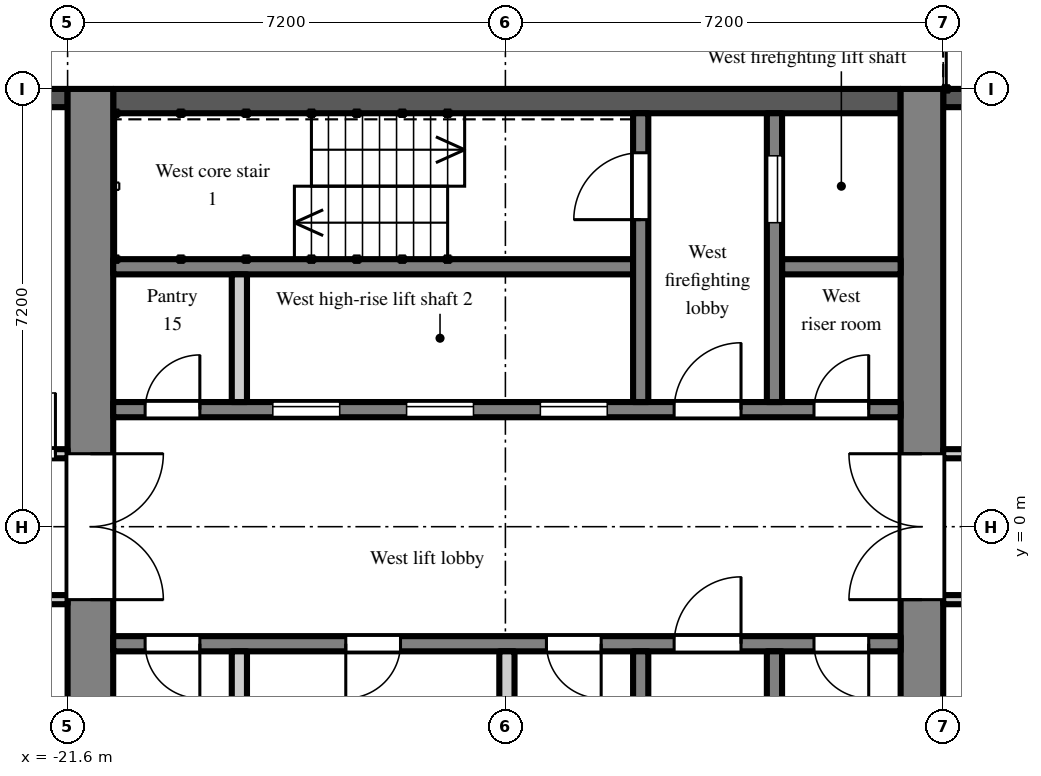
"""IFC4 building model, lengths in metres.
Left out: names, types, materials, properties, quantities, classifications, styles, units other than length and angle.
Written with IfcOpenShell. Run it as: python <this file> out.ifc"""

import sys

from ifc_helpers import new_model, si_unit, direction, frame, frame_2d, origin, place, context, subcontext, project, spatial, rectangle, extrude, element, fill, save


model = new_model("IFC4")
c1 = context("Model", 3, precision=1e-05, world=origin(), true_north=direction((0.0, 1.0)))
c2 = subcontext(c1, "Body", "Model", "MODEL_VIEW")
j1 = project(units=[si_unit("LENGTHUNIT", "METRE"), si_unit("PLANEANGLEUNIT", "RADIAN")], contexts=[c1])
p1 = place(None, origin())
s1 = spatial("IfcSite", under=j1, at=p1, CompositionType="ELEMENT")
p2 = place(p1, origin())
s2 = spatial("IfcBuilding", under=s1, at=p2, CompositionType="ELEMENT")
p3 = place(p2, frame((0.0, 0.0, 231.9)))
s3 = spatial("IfcBuildingStorey", under=s2, at=p3, CompositionType="ELEMENT", Elevation=231.9)
p4 = place(p3, frame((-4.2, 7.05, 0.0), z_axis=(0.0, 0.0, 1.0), x_axis=(-1.0, 0.0, 0.0)))
e1 = element("IfcWall", 1, at=p4, inside=s3, PredefinedType="SOLIDWALL", context=c2, shape_type="SweptSolid", body=[
    extrude(rectangle(XDim=3.0, YDim=0.3, at=frame_2d((1.5, 0.0))), origin(), (0.0, 0.0, 1.0), 2.3),
])
p5 = place(p3, frame((-21.6, 7.05, 0.0), z_axis=(0.0, 0.0, 1.0), x_axis=(-1.0, 0.0, 0.0)))
e2 = element("IfcWall", 2, at=p5, inside=s3, PredefinedType="SOLIDWALL", context=c2, shape_type="SweptSolid", body=[
    extrude(rectangle(XDim=2.7, YDim=0.3, at=frame_2d((1.35, 0.0))), origin(), (0.0, 0.0, 1.0), 2.3),
])
p6 = place(p5, frame((0.75, 0.0, 0.2)))
e3 = element("IfcOpeningElement", 3, at=p6, cuts=e2, PredefinedType="OPENING", context=c2, shape_type="SweptSolid", body=[
    extrude(rectangle(XDim=1.2, YDim=1.85, at=frame_2d((0.6, 0.925))), frame((0.0, 0.16, 0.0), z_axis=(0.0, -1.0, 0.0), x_axis=(1.0, 0.0, 0.0)), (0.0, 0.0, 1.0), 0.32),
])
p7 = place(p3, frame((-7.55, -7.2, 0.0), z_axis=(0.0, 0.0, 1.0), x_axis=(0.0, 1.0, 0.0)))
e4 = element("IfcWall", 4, at=p7, inside=s3, PredefinedType="SHEAR", context=c2, shape_type="SweptSolid", body=[
    extrude(rectangle(XDim=14.4, YDim=0.7, at=frame_2d((7.2, 0.0))), origin(), (0.0, 0.0, 1.0), 2.6),
])
p8 = place(p7, frame((6.0, 0.0, 0.0)))
e5 = element("IfcOpeningElement", 5, at=p8, cuts=e4, PredefinedType="OPENING", context=c2, shape_type="SweptSolid", body=[
    extrude(rectangle(XDim=2.4, YDim=2.2, at=frame_2d((1.2, 1.1))), frame((0.0, 0.36, 0.0), z_axis=(0.0, -1.0, 0.0), x_axis=(1.0, 0.0, 0.0)), (0.0, 0.0, 1.0), 0.72),
])
p9 = place(p3, frame((-21.225, -7.2, 0.0), z_axis=(0.0, 0.0, 1.0), x_axis=(0.0, 1.0, 0.0)))
e6 = element("IfcWall", 6, at=p9, inside=s3, PredefinedType="SHEAR", context=c2, shape_type="SweptSolid", body=[
    extrude(rectangle(XDim=14.4, YDim=0.75, at=frame_2d((7.2, 0.0))), origin(), (0.0, 0.0, 1.0), 2.6),
])
p10 = place(p9, frame((6.0, 0.0, 0.0)))
e7 = element("IfcOpeningElement", 7, at=p10, cuts=e6, PredefinedType="OPENING", context=c2, shape_type="SweptSolid", body=[
    extrude(rectangle(XDim=2.4, YDim=2.2, at=frame_2d((1.2, 1.1))), frame((0.0, 0.385, 0.0), z_axis=(0.0, -1.0, 0.0), x_axis=(1.0, 0.0, 0.0)), (0.0, 0.0, 1.0), 0.77),
])
p11 = place(p3, frame((-7.9, 7.0, 0.0), z_axis=(0.0, 0.0, 1.0), x_axis=(-1.0, 0.0, 0.0)))
e8 = element("IfcWall", 8, at=p11, inside=s3, PredefinedType="SHEAR", context=c2, shape_type="SweptSolid", body=[
    extrude(rectangle(XDim=12.95, YDim=0.4, at=frame_2d((6.475, 0.0))), origin(), (0.0, 0.0, 1.0), 2.6),
])
p12 = place(p3, frame((-7.9, 1.925, 0.0), z_axis=(0.0, 0.0, 1.0), x_axis=(-1.0, 0.0, 0.0)))
e9 = element("IfcWall", 9, at=p12, inside=s3, PredefinedType="SHEAR", context=c2, shape_type="SweptSolid", body=[
    extrude(rectangle(XDim=12.95, YDim=0.25, at=frame_2d((6.475, 0.0))), origin(), (0.0, 0.0, 1.0), 2.6),
])
p13 = place(p12, frame((4.825, 0.0, 0.0)))
e10 = element("IfcOpeningElement", 10, at=p13, cuts=e9, PredefinedType="OPENING", context=c2, shape_type="SweptSolid", body=[
    extrude(rectangle(XDim=1.1, YDim=2.1, at=frame_2d((0.55, 1.05))), frame((0.0, 0.135, 0.0), z_axis=(0.0, -1.0, 0.0), x_axis=(1.0, 0.0, 0.0)), (0.0, 0.0, 1.0), 0.27),
])
p14 = place(p12, frame((7.025, 0.0, 0.0)))
e11 = element("IfcOpeningElement", 11, at=p14, cuts=e9, PredefinedType="OPENING", context=c2, shape_type="SweptSolid", body=[
    extrude(rectangle(XDim=1.1, YDim=2.1, at=frame_2d((0.55, 1.05))), frame((0.0, 0.135, 0.0), z_axis=(0.0, -1.0, 0.0), x_axis=(1.0, 0.0, 0.0)), (0.0, 0.0, 1.0), 0.27),
])
p15 = place(p12, frame((9.225, 0.0, 0.0)))
e12 = element("IfcOpeningElement", 12, at=p15, cuts=e9, PredefinedType="OPENING", context=c2, shape_type="SweptSolid", body=[
    extrude(rectangle(XDim=1.1, YDim=2.1, at=frame_2d((0.55, 1.05))), frame((0.0, 0.135, 0.0), z_axis=(0.0, -1.0, 0.0), x_axis=(1.0, 0.0, 0.0)), (0.0, 0.0, 1.0), 0.27),
])
p16 = place(p12, frame((0.525, 0.0, 0.0)))
e13 = element("IfcOpeningElement", 13, at=p16, cuts=e9, PredefinedType="OPENING", context=c2, shape_type="SweptSolid", body=[
    extrude(rectangle(XDim=0.9, YDim=2.1, at=frame_2d((0.45, 1.05))), frame((0.0, 0.135, 0.0), z_axis=(0.0, -1.0, 0.0), x_axis=(1.0, 0.0, 0.0)), (0.0, 0.0, 1.0), 0.27),
])
p17 = place(p12, frame((2.625, 0.0, 0.0)))
e14 = element("IfcOpeningElement", 14, at=p17, cuts=e9, PredefinedType="OPENING", context=c2, shape_type="SweptSolid", body=[
    extrude(rectangle(XDim=1.1, YDim=2.1, at=frame_2d((0.55, 1.05))), frame((0.0, 0.135, 0.0), z_axis=(0.0, -1.0, 0.0), x_axis=(1.0, 0.0, 0.0)), (0.0, 0.0, 1.0), 0.27),
])
p18 = place(p12, frame((11.525, 0.0, 0.0)))
e15 = element("IfcOpeningElement", 15, at=p18, cuts=e9, PredefinedType="OPENING", context=c2, shape_type="SweptSolid", body=[
    extrude(rectangle(XDim=0.9, YDim=2.1, at=frame_2d((0.45, 1.05))), frame((0.0, 0.135, 0.0), z_axis=(0.0, -1.0, 0.0), x_axis=(1.0, 0.0, 0.0)), (0.0, 0.0, 1.0), 0.27),
])
p19 = place(p3, frame((-7.9, 4.275, 0.0), z_axis=(0.0, 0.0, 1.0), x_axis=(-1.0, 0.0, 0.0)))
e16 = element("IfcWall", 16, at=p19, inside=s3, PredefinedType="SHEAR", context=c2, shape_type="SweptSolid", body=[
    extrude(rectangle(XDim=1.95, YDim=0.25, at=frame_2d((0.975, 0.0))), origin(), (0.0, 0.0, 1.0), 2.6),
])
p20 = place(p3, frame((-12.3, 4.275, 0.0), z_axis=(0.0, 0.0, 1.0), x_axis=(-1.0, 0.0, 0.0)))
e17 = element("IfcWall", 17, at=p20, inside=s3, PredefinedType="SHEAR", context=c2, shape_type="SweptSolid", body=[
    extrude(rectangle(XDim=8.55, YDim=0.25, at=frame_2d((4.275, 0.0))), origin(), (0.0, 0.0, 1.0), 2.6),
])
p21 = place(p3, frame((-9.975, 2.05, 0.0), z_axis=(0.0, 0.0, 1.0), x_axis=(0.0, 1.0, 0.0)))
e18 = element("IfcWall", 18, at=p21, inside=s3, PredefinedType="SHEAR", context=c2, shape_type="SweptSolid", body=[
    extrude(rectangle(XDim=4.75, YDim=0.25, at=frame_2d((2.375, 0.0))), origin(), (0.0, 0.0, 1.0), 2.6),
])
p22 = place(p21, frame((2.95, 0.0, 0.0)))
e19 = element("IfcOpeningElement", 19, at=p22, cuts=e18, PredefinedType="OPENING", context=c2, shape_type="SweptSolid", body=[
    extrude(rectangle(XDim=1.1, YDim=2.1, at=frame_2d((0.55, 1.05))), frame((0.0, 0.135, 0.0), z_axis=(0.0, -1.0, 0.0), x_axis=(1.0, 0.0, 0.0)), (0.0, 0.0, 1.0), 0.27),
])
p23 = place(p3, frame((-12.175, 2.05, 0.0), z_axis=(0.0, 0.0, 1.0), x_axis=(0.0, 1.0, 0.0)))
e20 = element("IfcWall", 20, at=p23, inside=s3, PredefinedType="SHEAR", context=c2, shape_type="SweptSolid", body=[
    extrude(rectangle(XDim=4.75, YDim=0.25, at=frame_2d((2.375, 0.0))), origin(), (0.0, 0.0, 1.0), 2.6),
])
p24 = place(p23, frame((3.0, 0.0, 0.0)))
e21 = element("IfcOpeningElement", 21, at=p24, cuts=e20, PredefinedType="OPENING", context=c2, shape_type="SweptSolid", body=[
    extrude(rectangle(XDim=1.1, YDim=2.1, at=frame_2d((0.55, 1.05))), frame((0.0, 0.135, 0.0), z_axis=(0.0, -1.0, 0.0), x_axis=(1.0, 0.0, 0.0)), (0.0, 0.0, 1.0), 0.27),
])
p25 = place(p3, frame((-18.775, 2.05, 0.0), z_axis=(0.0, 0.0, 1.0), x_axis=(0.0, 1.0, 0.0)))
e22 = element("IfcWall", 22, at=p25, inside=s3, PredefinedType="PARTITIONING", context=c2, shape_type="SweptSolid", body=[
    extrude(rectangle(XDim=2.1, YDim=0.25, at=frame_2d((1.05, 0.0))), origin(), (0.0, 0.0, 1.0), 2.6),
])
p26 = place(p3, frame((-7.9, -1.925, 0.0), z_axis=(0.0, 0.0, 1.0), x_axis=(-1.0, 0.0, 0.0)))
e23 = element("IfcWall", 23, at=p26, inside=s3, PredefinedType="SHEAR", context=c2, shape_type="SweptSolid", body=[
    extrude(rectangle(XDim=12.95, YDim=0.25, at=frame_2d((6.475, 0.0))), origin(), (0.0, 0.0, 1.0), 2.6),
])
p27 = place(p26, frame((0.525, 0.0, 0.0)))
e24 = element("IfcOpeningElement", 24, at=p27, cuts=e23, PredefinedType="OPENING", context=c2, shape_type="SweptSolid", body=[
    extrude(rectangle(XDim=0.9, YDim=2.1, at=frame_2d((0.45, 1.05))), frame((0.0, 0.135, 0.0), z_axis=(0.0, -1.0, 0.0), x_axis=(1.0, 0.0, 0.0)), (0.0, 0.0, 1.0), 0.27),
])
p28 = place(p26, frame((2.625, 0.0, 0.0)))
e25 = element("IfcOpeningElement", 25, at=p28, cuts=e23, PredefinedType="OPENING", context=c2, shape_type="SweptSolid", body=[
    extrude(rectangle(XDim=1.1, YDim=2.1, at=frame_2d((0.55, 1.05))), frame((0.0, 0.135, 0.0), z_axis=(0.0, -1.0, 0.0), x_axis=(1.0, 0.0, 0.0)), (0.0, 0.0, 1.0), 0.27),
])
p29 = place(p26, frame((4.925, 0.0, 0.0)))
e26 = element("IfcOpeningElement", 26, at=p29, cuts=e23, PredefinedType="OPENING", context=c2, shape_type="SweptSolid", body=[
    extrude(rectangle(XDim=0.9, YDim=2.1, at=frame_2d((0.45, 1.05))), frame((0.0, 0.135, 0.0), z_axis=(0.0, -1.0, 0.0), x_axis=(1.0, 0.0, 0.0)), (0.0, 0.0, 1.0), 0.27),
])
p30 = place(p26, frame((8.225, 0.0, 0.0)))
e27 = element("IfcOpeningElement", 27, at=p30, cuts=e23, PredefinedType="OPENING", context=c2, shape_type="SweptSolid", body=[
    extrude(rectangle(XDim=0.9, YDim=2.1, at=frame_2d((0.45, 1.05))), frame((0.0, 0.135, 0.0), z_axis=(0.0, -1.0, 0.0), x_axis=(1.0, 0.0, 0.0)), (0.0, 0.0, 1.0), 0.27),
])
p31 = place(p26, frame((11.525, 0.0, 0.0)))
e28 = element("IfcOpeningElement", 28, at=p31, cuts=e23, PredefinedType="OPENING", context=c2, shape_type="SweptSolid", body=[
    extrude(rectangle(XDim=0.9, YDim=2.1, at=frame_2d((0.45, 1.05))), frame((0.0, 0.135, 0.0), z_axis=(0.0, -1.0, 0.0), x_axis=(1.0, 0.0, 0.0)), (0.0, 0.0, 1.0), 0.27),
])
p32 = place(p3, frame((-9.975, -2.05, 0.0), z_axis=(0.0, 0.0, 1.0), x_axis=(0.0, -1.0, 0.0)))
e29 = element("IfcWall", 29, at=p32, inside=s3, PredefinedType="SHEAR", context=c2, shape_type="SweptSolid", body=[
    extrude(rectangle(XDim=4.75, YDim=0.25, at=frame_2d((2.375, 0.0))), origin(), (0.0, 0.0, 1.0), 2.6),
])
p33 = place(p32, frame((2.95, 0.0, 0.0)))
e30 = element("IfcOpeningElement", 30, at=p33, cuts=e29, PredefinedType="OPENING", context=c2, shape_type="SweptSolid", body=[
    extrude(rectangle(XDim=1.1, YDim=2.1, at=frame_2d((0.55, 1.05))), frame((0.0, 0.135, 0.0), z_axis=(0.0, -1.0, 0.0), x_axis=(1.0, 0.0, 0.0)), (0.0, 0.0, 1.0), 0.27),
])
p34 = place(p3, frame((-12.175, -2.05, 0.0), z_axis=(0.0, 0.0, 1.0), x_axis=(0.0, -1.0, 0.0)))
e31 = element("IfcWall", 31, at=p34, inside=s3, PredefinedType="SHEAR", context=c2, shape_type="SweptSolid", body=[
    extrude(rectangle(XDim=4.75, YDim=0.25, at=frame_2d((2.375, 0.0))), origin(), (0.0, 0.0, 1.0), 2.6),
])
p35 = place(p34, frame((3.0, 0.0, 0.0)))
e32 = element("IfcOpeningElement", 32, at=p35, cuts=e31, PredefinedType="OPENING", context=c2, shape_type="SweptSolid", body=[
    extrude(rectangle(XDim=1.1, YDim=2.1, at=frame_2d((0.55, 1.05))), frame((0.0, 0.135, 0.0), z_axis=(0.0, -1.0, 0.0), x_axis=(1.0, 0.0, 0.0)), (0.0, 0.0, 1.0), 0.27),
])
for number, where, z_axis, x_axis in (
    (33, (-14.375, -2.05, 0.0), (0.0, 0.0, 1.0), (0.0, -1.0, 0.0)),
    (34, (-18.775, -2.05, 0.0), (0.0, 0.0, 1.0), (0.0, -1.0, 0.0)),
):
    element("IfcWall", number, at=place(p3, frame(where, z_axis=z_axis, x_axis=x_axis)), inside=s3, PredefinedType="PARTITIONING", context=c2, shape_type="SweptSolid", body=[
        extrude(rectangle(XDim=2.1, YDim=0.25, at=frame_2d((1.05, 0.0))), origin(), (0.0, 0.0, 1.0), 2.6),
    ])
p36 = place(p3, frame((-26.725, -1.2, 0.0), z_axis=(0.0, 0.0, 1.0), x_axis=(1.0, 0.0, 0.0)))
e35 = element("IfcWall", 35, at=p36, inside=s3, PredefinedType="PARTITIONING", context=c2, shape_type="SweptSolid", body=[
    extrude(rectangle(XDim=5.125, YDim=0.15, at=frame_2d((2.562, 0.0))), origin(), (0.0, 0.0, 1.0), 2.6),
])
p37 = place(p36, frame((3.525, 0.0, 0.0)))
e36 = element("IfcOpeningElement", 36, at=p37, cuts=e35, PredefinedType="OPENING", context=c2, shape_type="SweptSolid", body=[
    extrude(rectangle(XDim=1.0, YDim=2.1, at=frame_2d((0.5, 1.05))), frame((0.0, 0.085, 0.0), z_axis=(0.0, -1.0, 0.0), x_axis=(1.0, 0.0, 0.0)), (0.0, 0.0, 1.0), 0.17),
])
p38 = place(p3, frame((-26.725, 1.2, 0.0), z_axis=(0.0, 0.0, 1.0), x_axis=(1.0, 0.0, 0.0)))
e37 = element("IfcWall", 37, at=p38, inside=s3, PredefinedType="PARTITIONING", context=c2, shape_type="SweptSolid", body=[
    extrude(rectangle(XDim=5.125, YDim=0.15, at=frame_2d((2.562, 0.0))), origin(), (0.0, 0.0, 1.0), 2.6),
])
p39 = place(p38, frame((3.925, 0.0, 0.0)))
e38 = element("IfcOpeningElement", 38, at=p39, cuts=e37, PredefinedType="OPENING", context=c2, shape_type="SweptSolid", body=[
    extrude(rectangle(XDim=1.0, YDim=2.1, at=frame_2d((0.5, 1.05))), frame((0.0, 0.085, 0.0), z_axis=(0.0, -1.0, 0.0), x_axis=(1.0, 0.0, 0.0)), (0.0, 0.0, 1.0), 0.17),
])
p40 = place(p38, frame((0.275, 0.0, 0.0)))
e39 = element("IfcOpeningElement", 39, at=p40, cuts=e37, PredefinedType="OPENING", context=c2, shape_type="SweptSolid", body=[
    extrude(rectangle(XDim=0.9, YDim=2.1, at=frame_2d((0.45, 1.05))), frame((0.0, 0.085, 0.0), z_axis=(0.0, -1.0, 0.0), x_axis=(1.0, 0.0, 0.0)), (0.0, 0.0, 1.0), 0.17),
])
p41 = place(p3, frame((-7.2, -1.2, 0.0), z_axis=(0.0, 0.0, 1.0), x_axis=(1.0, 0.0, 0.0)))
e40 = element("IfcWall", 40, at=p41, inside=s3, PredefinedType="PARTITIONING", context=c2, shape_type="SweptSolid", body=[
    extrude(rectangle(XDim=6.075, YDim=0.15, at=frame_2d((3.038, 0.0))), origin(), (0.0, 0.0, 1.0), 2.6),
])
p42 = place(p41, frame((2.55, 0.0, 0.0)))
e41 = element("IfcOpeningElement", 41, at=p42, cuts=e40, PredefinedType="OPENING", context=c2, shape_type="SweptSolid", body=[
    extrude(rectangle(XDim=0.9, YDim=2.1, at=frame_2d((0.45, 1.05))), frame((0.0, 0.085, 0.0), z_axis=(0.0, -1.0, 0.0), x_axis=(1.0, 0.0, 0.0)), (0.0, 0.0, 1.0), 0.17),
])
p43 = place(p41, frame((0.55, 0.0, 0.0)))
e42 = element("IfcOpeningElement", 42, at=p43, cuts=e40, PredefinedType="OPENING", context=c2, shape_type="SweptSolid", body=[
    extrude(rectangle(XDim=0.9, YDim=2.1, at=frame_2d((0.45, 1.05))), frame((0.0, 0.085, 0.0), z_axis=(0.0, -1.0, 0.0), x_axis=(1.0, 0.0, 0.0)), (0.0, 0.0, 1.0), 0.17),
])
p44 = place(p3, frame((-7.2, 1.2, 0.0), z_axis=(0.0, 0.0, 1.0), x_axis=(1.0, 0.0, 0.0)))
e43 = element("IfcWall", 43, at=p44, inside=s3, PredefinedType="PARTITIONING", context=c2, shape_type="SweptSolid", body=[
    extrude(rectangle(XDim=6.075, YDim=0.15, at=frame_2d((3.038, 0.0))), origin(), (0.0, 0.0, 1.0), 2.6),
])
p45 = place(p44, frame((1.95, 0.0, 0.0)))
e44 = element("IfcOpeningElement", 44, at=p45, cuts=e43, PredefinedType="OPENING", context=c2, shape_type="SweptSolid", body=[
    extrude(rectangle(XDim=0.9, YDim=2.1, at=frame_2d((0.45, 1.05))), frame((0.0, 0.085, 0.0), z_axis=(0.0, -1.0, 0.0), x_axis=(1.0, 0.0, 0.0)), (0.0, 0.0, 1.0), 0.17),
])
p46 = place(p13, origin())
e45 = element("IfcDoor", 45, at=p46, inside=s3, OperationType="SLIDING_TO_LEFT", PredefinedType="DOOR", context=c2, shape_type="SweptSolid", body=[
    extrude(rectangle(XDim=1.1, YDim=2.1, at=frame_2d((0.55, 1.05))), frame((0.0, 0.025, 0.0), z_axis=(0.0, -1.0, 0.0), x_axis=(1.0, 0.0, 0.0)), (0.0, 0.0, 1.0), 0.05),
])
fill(e10, e45)
p47 = place(p14, origin())
e46 = element("IfcDoor", 46, at=p47, inside=s3, OperationType="SLIDING_TO_LEFT", PredefinedType="DOOR", context=c2, shape_type="SweptSolid", body=[
    extrude(rectangle(XDim=1.1, YDim=2.1, at=frame_2d((0.55, 1.05))), frame((0.0, 0.025, 0.0), z_axis=(0.0, -1.0, 0.0), x_axis=(1.0, 0.0, 0.0)), (0.0, 0.0, 1.0), 0.05),
])
fill(e11, e46)
p48 = place(p15, origin())
e47 = element("IfcDoor", 47, at=p48, inside=s3, OperationType="SLIDING_TO_LEFT", PredefinedType="DOOR", context=c2, shape_type="SweptSolid", body=[
    extrude(rectangle(XDim=1.1, YDim=2.1, at=frame_2d((0.55, 1.05))), frame((0.0, 0.025, 0.0), z_axis=(0.0, -1.0, 0.0), x_axis=(1.0, 0.0, 0.0)), (0.0, 0.0, 1.0), 0.05),
])
fill(e12, e47)
p49 = place(p22, origin())
e48 = element("IfcDoor", 48, at=p49, inside=s3, OperationType="SLIDING_TO_LEFT", PredefinedType="DOOR", context=c2, shape_type="SweptSolid", body=[
    extrude(rectangle(XDim=1.1, YDim=2.1, at=frame_2d((0.55, 1.05))), frame((0.0, 0.025, 0.0), z_axis=(0.0, -1.0, 0.0), x_axis=(1.0, 0.0, 0.0)), (0.0, 0.0, 1.0), 0.05),
])
fill(e19, e48)
p50 = place(p24, origin())
e49 = element("IfcDoor", 49, at=p50, inside=s3, OperationType="SINGLE_SWING_LEFT", PredefinedType="DOOR", context=c2, shape_type="SweptSolid", body=[
    extrude(rectangle(XDim=1.1, YDim=2.1, at=frame_2d((0.55, 1.05))), frame((0.0, 0.025, 0.0), z_axis=(0.0, -1.0, 0.0), x_axis=(1.0, 0.0, 0.0)), (0.0, 0.0, 1.0), 0.05),
])
fill(e21, e49)
p51 = place(p16, frame((0.9, 0.0, 0.0), z_axis=(0.0, 0.0, 1.0), x_axis=(-1.0, 0.0, 0.0)))
e50 = element("IfcDoor", 50, at=p51, inside=s3, OperationType="SINGLE_SWING_RIGHT", PredefinedType="DOOR", context=c2, shape_type="SweptSolid", body=[
    extrude(rectangle(XDim=0.9, YDim=2.1, at=frame_2d((0.45, 1.05))), frame((0.0, 0.025, 0.0), z_axis=(0.0, -1.0, 0.0), x_axis=(1.0, 0.0, 0.0)), (0.0, 0.0, 1.0), 0.05),
])
fill(e13, e50)
p52 = place(p27, origin())
e51 = element("IfcDoor", 51, at=p52, inside=s3, OperationType="SINGLE_SWING_LEFT", PredefinedType="DOOR", context=c2, shape_type="SweptSolid", body=[
    extrude(rectangle(XDim=0.9, YDim=2.1, at=frame_2d((0.45, 1.05))), frame((0.0, 0.025, 0.0), z_axis=(0.0, -1.0, 0.0), x_axis=(1.0, 0.0, 0.0)), (0.0, 0.0, 1.0), 0.05),
])
fill(e24, e51)
p53 = place(p17, frame((1.1, 0.0, 0.0), z_axis=(0.0, 0.0, 1.0), x_axis=(-1.0, 0.0, 0.0)))
e52 = element("IfcDoor", 52, at=p53, inside=s3, OperationType="SINGLE_SWING_RIGHT", PredefinedType="DOOR", context=c2, shape_type="SweptSolid", body=[
    extrude(rectangle(XDim=1.1, YDim=2.1, at=frame_2d((0.55, 1.05))), frame((0.0, 0.025, 0.0), z_axis=(0.0, -1.0, 0.0), x_axis=(1.0, 0.0, 0.0)), (0.0, 0.0, 1.0), 0.05),
])
fill(e14, e52)
p54 = place(p28, frame((1.1, 0.0, 0.0), z_axis=(0.0, 0.0, 1.0), x_axis=(-1.0, 0.0, 0.0)))
e53 = element("IfcDoor", 53, at=p54, inside=s3, OperationType="SINGLE_SWING_RIGHT", PredefinedType="DOOR", context=c2, shape_type="SweptSolid", body=[
    extrude(rectangle(XDim=1.1, YDim=2.1, at=frame_2d((0.55, 1.05))), frame((0.0, 0.025, 0.0), z_axis=(0.0, -1.0, 0.0), x_axis=(1.0, 0.0, 0.0)), (0.0, 0.0, 1.0), 0.05),
])
fill(e25, e53)
p55 = place(p8, origin())
e54 = element("IfcDoor", 54, at=p55, inside=s3, OperationType="DOUBLE_DOOR_DOUBLE_SWING", PredefinedType="DOOR", context=c2, shape_type="SweptSolid", body=[
    extrude(rectangle(XDim=2.4, YDim=2.2, at=frame_2d((1.2, 1.1))), frame((0.0, 0.025, 0.0), z_axis=(0.0, -1.0, 0.0), x_axis=(1.0, 0.0, 0.0)), (0.0, 0.0, 1.0), 0.05),
])
fill(e5, e54)
p56 = place(p10, frame((2.4, 0.0, 0.0), z_axis=(0.0, 0.0, 1.0), x_axis=(-1.0, 0.0, 0.0)))
e55 = element("IfcDoor", 55, at=p56, inside=s3, OperationType="DOUBLE_DOOR_DOUBLE_SWING", PredefinedType="DOOR", context=c2, shape_type="SweptSolid", body=[
    extrude(rectangle(XDim=2.4, YDim=2.2, at=frame_2d((1.2, 1.1))), frame((0.0, 0.025, 0.0), z_axis=(0.0, -1.0, 0.0), x_axis=(1.0, 0.0, 0.0)), (0.0, 0.0, 1.0), 0.05),
])
fill(e7, e55)
p57 = place(p18, frame((0.9, 0.0, 0.0), z_axis=(0.0, 0.0, 1.0), x_axis=(-1.0, 0.0, 0.0)))
e56 = element("IfcDoor", 56, at=p57, inside=s3, OperationType="SINGLE_SWING_RIGHT", PredefinedType="DOOR", context=c2, shape_type="SweptSolid", body=[
    extrude(rectangle(XDim=0.9, YDim=2.1, at=frame_2d((0.45, 1.05))), frame((0.0, 0.025, 0.0), z_axis=(0.0, -1.0, 0.0), x_axis=(1.0, 0.0, 0.0)), (0.0, 0.0, 1.0), 0.05),
])
fill(e15, e56)
p58 = place(p29, origin())
e57 = element("IfcDoor", 57, at=p58, inside=s3, OperationType="SINGLE_SWING_LEFT", PredefinedType="DOOR", context=c2, shape_type="SweptSolid", body=[
    extrude(rectangle(XDim=0.9, YDim=2.1, at=frame_2d((0.45, 1.05))), frame((0.0, 0.025, 0.0), z_axis=(0.0, -1.0, 0.0), x_axis=(1.0, 0.0, 0.0)), (0.0, 0.0, 1.0), 0.05),
])
fill(e26, e57)
p59 = place(p30, origin())
e58 = element("IfcDoor", 58, at=p59, inside=s3, OperationType="SINGLE_SWING_RIGHT", PredefinedType="DOOR", context=c2, shape_type="SweptSolid", body=[
    extrude(rectangle(XDim=0.9, YDim=2.1, at=frame_2d((0.45, 1.05))), frame((0.0, 0.025, 0.0), z_axis=(0.0, -1.0, 0.0), x_axis=(1.0, 0.0, 0.0)), (0.0, 0.0, 1.0), 0.05),
])
fill(e27, e58)
p60 = place(p31, origin())
e59 = element("IfcDoor", 59, at=p60, inside=s3, OperationType="SINGLE_SWING_LEFT", PredefinedType="DOOR", context=c2, shape_type="SweptSolid", body=[
    extrude(rectangle(XDim=0.9, YDim=2.1, at=frame_2d((0.45, 1.05))), frame((0.0, 0.025, 0.0), z_axis=(0.0, -1.0, 0.0), x_axis=(1.0, 0.0, 0.0)), (0.0, 0.0, 1.0), 0.05),
])
fill(e28, e59)
p61 = place(p39, origin())
e60 = element("IfcDoor", 60, at=p61, inside=s3, OperationType="SINGLE_SWING_RIGHT", PredefinedType="DOOR", context=c2, shape_type="SweptSolid", body=[
    extrude(rectangle(XDim=1.0, YDim=2.1, at=frame_2d((0.5, 1.05))), frame((0.0, 0.025, 0.0), z_axis=(0.0, -1.0, 0.0), x_axis=(1.0, 0.0, 0.0)), (0.0, 0.0, 1.0), 0.05),
])
fill(e38, e60)
save(model, sys.argv[1])
